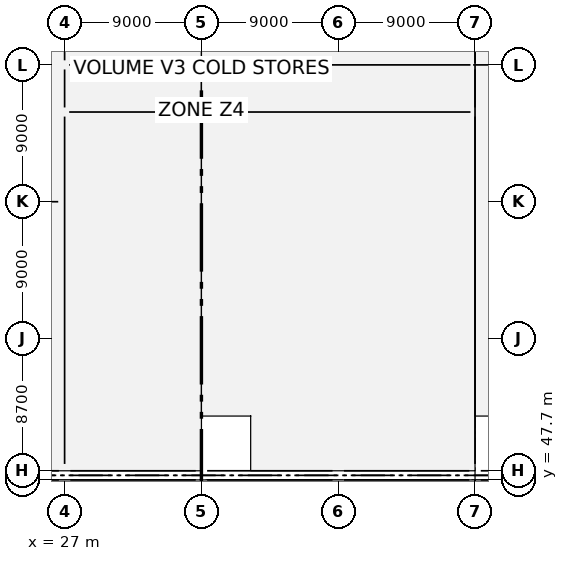
"""IFC4 building model, lengths in metres.
Left out: names, types, materials, properties, quantities, classifications, styles, units other than length and angle.
Written with IfcOpenShell. Run it as: python <this file> out.ifc"""

import sys

from ifc_helpers import new_model, si_unit, direction, frame, frame_2d, origin, origin_2d, place, context, subcontext, project, spatial, rectangle, extrude, element, fill, save


model = new_model("IFC4")
c1 = context("Model", 3, precision=1e-05, world=origin(), true_north=direction((0.0, 1.0)))
c2 = subcontext(c1, "Body", "Model", "MODEL_VIEW")
j1 = project(units=[si_unit("LENGTHUNIT", "METRE"), si_unit("PLANEANGLEUNIT", "RADIAN")], contexts=[c1])
p1 = place(None, origin())
s1 = spatial("IfcSite", under=j1, at=p1, CompositionType="ELEMENT")
p2 = place(p1, origin())
s2 = spatial("IfcBuilding", under=s1, at=p2, CompositionType="ELEMENT")
p3 = place(p2, origin())
s3 = spatial("IfcBuildingStorey", under=s2, at=p3, CompositionType="ELEMENT", Elevation=0.0)
for number, where, z_axis, x_axis in (
    (1, (27.0, 47.7, -0.5), (0.0, 0.0, 1.0), (1.0, 0.0, 0.0)),
    (2, (27.0, 48.3, -0.5), (0.0, 0.0, 1.0), (1.0, 0.0, 0.0)),
):
    element("IfcColumn", number, at=place(p3, frame(where, z_axis=z_axis, x_axis=x_axis)), inside=s3, PredefinedType="COLUMN", context=c2, shape_type="SweptSolid", body=[
        extrude(rectangle(XDim=0.75, YDim=0.55, at=origin_2d()), origin(), (0.0, 0.0, 1.0), 6.8),
    ])
for number, where, z_axis, x_axis in (
    (3, (27.0, 57.0, -0.5), (0.0, 0.0, 1.0), (1.0, 0.0, 0.0)),
    (4, (27.0, 66.0, -0.5), (0.0, 0.0, 1.0), (1.0, 0.0, 0.0)),
    (5, (27.0, 75.0, -0.5), (0.0, 0.0, 1.0), (1.0, 0.0, 0.0)),
):
    element("IfcColumn", number, at=place(p3, frame(where, z_axis=z_axis, x_axis=x_axis)), inside=s3, PredefinedType="COLUMN", context=c2, shape_type="SweptSolid", body=[
        extrude(rectangle(XDim=0.75, YDim=0.75, at=origin_2d()), origin(), (0.0, 0.0, 1.0), 6.8),
    ])
for number, where, z_axis, x_axis in (
    (6, (36.0, 47.7, -0.5), (0.0, 0.0, 1.0), (1.0, 0.0, 0.0)),
    (7, (36.0, 48.3, -0.5), (0.0, 0.0, 1.0), (1.0, 0.0, 0.0)),
):
    element("IfcColumn", number, at=place(p3, frame(where, z_axis=z_axis, x_axis=x_axis)), inside=s3, PredefinedType="COLUMN", context=c2, shape_type="SweptSolid", body=[
        extrude(rectangle(XDim=0.75, YDim=0.55, at=origin_2d()), origin(), (0.0, 0.0, 1.0), 6.8),
    ])
for number, where, z_axis, x_axis in (
    (8, (36.0, 57.0, -0.5), (0.0, 0.0, 1.0), (1.0, 0.0, 0.0)),
    (9, (36.0, 66.0, -0.5), (0.0, 0.0, 1.0), (1.0, 0.0, 0.0)),
    (10, (36.0, 75.0, -0.5), (0.0, 0.0, 1.0), (1.0, 0.0, 0.0)),
):
    element("IfcColumn", number, at=place(p3, frame(where, z_axis=z_axis, x_axis=x_axis)), inside=s3, PredefinedType="COLUMN", context=c2, shape_type="SweptSolid", body=[
        extrude(rectangle(XDim=0.75, YDim=0.75, at=origin_2d()), origin(), (0.0, 0.0, 1.0), 6.8),
    ])
for number, where, z_axis, x_axis in (
    (11, (45.0, 47.7, -0.5), (0.0, 0.0, 1.0), (1.0, 0.0, 0.0)),
    (12, (45.0, 48.3, -0.5), (0.0, 0.0, 1.0), (1.0, 0.0, 0.0)),
):
    element("IfcColumn", number, at=place(p3, frame(where, z_axis=z_axis, x_axis=x_axis)), inside=s3, PredefinedType="COLUMN", context=c2, shape_type="SweptSolid", body=[
        extrude(rectangle(XDim=0.75, YDim=0.55, at=origin_2d()), origin(), (0.0, 0.0, 1.0), 6.8),
    ])
for number, where, z_axis, x_axis in (
    (13, (45.0, 57.0, -0.5), (0.0, 0.0, 1.0), (1.0, 0.0, 0.0)),
    (14, (45.0, 66.0, -0.5), (0.0, 0.0, 1.0), (1.0, 0.0, 0.0)),
    (15, (45.0, 75.0, -0.5), (0.0, 0.0, 1.0), (1.0, 0.0, 0.0)),
):
    element("IfcColumn", number, at=place(p3, frame(where, z_axis=z_axis, x_axis=x_axis)), inside=s3, PredefinedType="COLUMN", context=c2, shape_type="SweptSolid", body=[
        extrude(rectangle(XDim=0.75, YDim=0.75, at=origin_2d()), origin(), (0.0, 0.0, 1.0), 6.8),
    ])
for number, where, z_axis, x_axis in (
    (16, (54.0, 47.7, -0.5), (0.0, 0.0, 1.0), (1.0, 0.0, 0.0)),
    (17, (54.0, 48.3, -0.5), (0.0, 0.0, 1.0), (1.0, 0.0, 0.0)),
):
    element("IfcColumn", number, at=place(p3, frame(where, z_axis=z_axis, x_axis=x_axis)), inside=s3, PredefinedType="COLUMN", context=c2, shape_type="SweptSolid", body=[
        extrude(rectangle(XDim=0.75, YDim=0.55, at=origin_2d()), origin(), (0.0, 0.0, 1.0), 6.8),
    ])
for number, where, z_axis, x_axis in (
    (18, (54.0, 57.0, -0.5), (0.0, 0.0, 1.0), (1.0, 0.0, 0.0)),
    (19, (54.0, 66.0, -0.5), (0.0, 0.0, 1.0), (1.0, 0.0, 0.0)),
    (20, (54.0, 75.0, -0.5), (0.0, 0.0, 1.0), (1.0, 0.0, 0.0)),
):
    element("IfcColumn", number, at=place(p3, frame(where, z_axis=z_axis, x_axis=x_axis)), inside=s3, PredefinedType="COLUMN", context=c2, shape_type="SweptSolid", body=[
        extrude(rectangle(XDim=0.75, YDim=0.75, at=origin_2d()), origin(), (0.0, 0.0, 1.0), 6.8),
    ])
for number, where, z_axis, x_axis in (
    (21, (18.375, 47.7, 0.0), (0.0, 0.0, 1.0), (1.0, 0.0, 0.0)),
    (22, (27.375, 47.7, 0.0), (0.0, 0.0, 1.0), (1.0, 0.0, 0.0)),
    (23, (36.375, 47.7, 0.0), (0.0, 0.0, 1.0), (1.0, 0.0, 0.0)),
    (24, (45.375, 47.7, 0.0), (0.0, 0.0, 1.0), (1.0, 0.0, 0.0)),
    (25, (54.375, 47.7, 0.0), (0.0, 0.0, 1.0), (1.0, 0.0, 0.0)),
):
    element("IfcWall", number, at=place(p3, frame(where, z_axis=z_axis, x_axis=x_axis)), inside=s3, PredefinedType="SOLIDWALL", context=c2, shape_type="SweptSolid", body=[
        extrude(rectangle(XDim=8.25, YDim=0.38, at=frame_2d((4.125, 0.0))), origin(), (0.0, 0.0, 1.0), 5.08),
    ])
p4 = place(p3, frame((18.375, 48.3, 0.0), z_axis=(0.0, 0.0, 1.0), x_axis=(1.0, 0.0, 0.0)))
e26 = element("IfcWall", 26, at=p4, inside=s3, PredefinedType="SOLIDWALL", context=c2, shape_type="SweptSolid", body=[
    extrude(rectangle(XDim=8.25, YDim=0.38, at=frame_2d((4.125, 0.0))), origin(), (0.0, 0.0, 1.0), 5.08),
])
p5 = place(p4, frame((3.325, 0.0, 3.59)))
e27 = element("IfcOpeningElement", 27, at=p5, cuts=e26, PredefinedType="OPENING", context=c2, shape_type="SweptSolid", body=[
    extrude(rectangle(XDim=1.6, YDim=1.45, at=frame_2d((0.8, 0.725))), frame((0.0, 0.2, 0.0), z_axis=(0.0, -1.0, 0.0), x_axis=(1.0, 0.0, 0.0)), (0.0, 0.0, 1.0), 0.4),
])
p6 = place(p3, frame((27.375, 48.3, 0.0), z_axis=(0.0, 0.0, 1.0), x_axis=(1.0, 0.0, 0.0)))
e28 = element("IfcWall", 28, at=p6, inside=s3, PredefinedType="SOLIDWALL", context=c2, shape_type="SweptSolid", body=[
    extrude(rectangle(XDim=8.25, YDim=0.38, at=frame_2d((4.125, 0.0))), origin(), (0.0, 0.0, 1.0), 5.08),
])
p7 = place(p3, frame((36.375, 48.3, 0.0), z_axis=(0.0, 0.0, 1.0), x_axis=(1.0, 0.0, 0.0)))
e29 = element("IfcWall", 29, at=p7, inside=s3, PredefinedType="SOLIDWALL", context=c2, shape_type="SweptSolid", body=[
    extrude(rectangle(XDim=8.25, YDim=0.38, at=frame_2d((4.125, 0.0))), origin(), (0.0, 0.0, 1.0), 5.08),
])
p8 = place(p7, frame((3.325, 0.0, 3.59)))
e30 = element("IfcOpeningElement", 30, at=p8, cuts=e29, PredefinedType="OPENING", context=c2, shape_type="SweptSolid", body=[
    extrude(rectangle(XDim=1.6, YDim=1.45, at=frame_2d((0.8, 0.725))), frame((0.0, 0.2, 0.0), z_axis=(0.0, -1.0, 0.0), x_axis=(1.0, 0.0, 0.0)), (0.0, 0.0, 1.0), 0.4),
])
p9 = place(p3, frame((45.375, 48.3, 0.0), z_axis=(0.0, 0.0, 1.0), x_axis=(1.0, 0.0, 0.0)))
e31 = element("IfcWall", 31, at=p9, inside=s3, PredefinedType="SOLIDWALL", context=c2, shape_type="SweptSolid", body=[
    extrude(rectangle(XDim=8.25, YDim=0.38, at=frame_2d((4.125, 0.0))), origin(), (0.0, 0.0, 1.0), 5.08),
])
p10 = place(p3, frame((54.375, 48.3, 0.0), z_axis=(0.0, 0.0, 1.0), x_axis=(1.0, 0.0, 0.0)))
e32 = element("IfcWall", 32, at=p10, inside=s3, PredefinedType="SOLIDWALL", context=c2, shape_type="SweptSolid", body=[
    extrude(rectangle(XDim=8.25, YDim=0.38, at=frame_2d((4.125, 0.0))), origin(), (0.0, 0.0, 1.0), 5.08),
])
p11 = place(p10, frame((3.325, 0.0, 3.59)))
e33 = element("IfcOpeningElement", 33, at=p11, cuts=e32, PredefinedType="OPENING", context=c2, shape_type="SweptSolid", body=[
    extrude(rectangle(XDim=1.6, YDim=1.45, at=frame_2d((0.8, 0.725))), frame((0.0, 0.2, 0.0), z_axis=(0.0, -1.0, 0.0), x_axis=(1.0, 0.0, 0.0)), (0.0, 0.0, 1.0), 0.4),
])
p12 = place(p3, frame((53.875, 75.0, -0.5), z_axis=(0.0, 0.0, 1.0), x_axis=(1.0, 0.0, 0.0)))
e34 = element("IfcWall", 34, at=p12, inside=s3, PredefinedType="SOLIDWALL", context=c2, shape_type="SweptSolid", body=[
    extrude(rectangle(XDim=9.25, YDim=0.25, at=frame_2d((4.625, 0.0))), origin(), (0.0, 0.0, 1.0), 6.8),
])
p13 = place(p3, frame((54.0, 75.125, -0.5), z_axis=(0.0, 0.0, 1.0), x_axis=(0.0, 1.0, 0.0)))
e35 = element("IfcWall", 35, at=p13, inside=s3, PredefinedType="SOLIDWALL", context=c2, shape_type="SweptSolid", body=[
    extrude(rectangle(XDim=7.95, YDim=0.25, at=frame_2d((3.975, 0.0))), origin(), (0.0, 0.0, 1.0), 6.8),
])
p14 = place(p13, frame((1.15, 0.0, 0.5)))
e36 = element("IfcOpeningElement", 36, at=p14, cuts=e35, PredefinedType="OPENING", context=c2, shape_type="SweptSolid", body=[
    extrude(rectangle(XDim=1.2, YDim=2.2, at=frame_2d((0.6, 1.1))), frame((0.0, 0.135, 0.0), z_axis=(0.0, -1.0, 0.0), x_axis=(1.0, 0.0, 0.0)), (0.0, 0.0, 1.0), 0.27),
])
p15 = place(p3, frame((18.42, 66.0, -0.5), z_axis=(0.0, 0.0, 1.0), x_axis=(1.0, 0.0, 0.0)))
e37 = element("IfcWall", 37, at=p15, inside=s3, PredefinedType="SHEAR", context=c2, shape_type="SweptSolid", body=[
    extrude(rectangle(XDim=8.16, YDim=0.33, at=frame_2d((4.08, 0.0))), origin(), (0.0, 0.0, 1.0), 6.48),
])
p16 = place(p3, frame((27.0, 72.2, 0.0), z_axis=(0.0, 0.0, 1.0), x_axis=(0.0, 1.0, 0.0)))
e38 = element("IfcWall", 38, at=p16, inside=s3, PredefinedType="PARTITIONING", context=c2, shape_type="SweptSolid", body=[
    extrude(rectangle(XDim=2.5, YDim=0.1, at=frame_2d((1.25, 0.0))), origin(), (0.0, 0.0, 1.0), 5.18),
])
p17 = place(p16, frame((0.78, 0.0, 0.0)))
e39 = element("IfcOpeningElement", 39, at=p17, cuts=e38, PredefinedType="OPENING", context=c2, shape_type="SweptSolid", body=[
    extrude(rectangle(XDim=0.94, YDim=2.14, at=frame_2d((0.47, 1.07))), frame((0.0, 0.06, 0.0), z_axis=(0.0, -1.0, 0.0), x_axis=(1.0, 0.0, 0.0)), (0.0, 0.0, 1.0), 0.12),
])
p18 = place(p3, frame((27.0, 48.75, 0.0), z_axis=(0.0, 0.0, 1.0), x_axis=(0.0, 1.0, 0.0)))
e40 = element("IfcWall", 40, at=p18, inside=s3, PredefinedType="STANDARD", context=c2, shape_type="SweptSolid", body=[
    extrude(rectangle(XDim=22.85, YDim=0.21, at=frame_2d((11.425, 0.0))), origin(), (0.0, 0.0, 1.0), 5.18),
])
p19 = place(p18, frame((11.75, 0.0, 0.0)))
e41 = element("IfcOpeningElement", 41, at=p19, cuts=e40, PredefinedType="OPENING", context=c2, shape_type="SweptSolid", body=[
    extrude(rectangle(XDim=2.0, YDim=2.5, at=frame_2d((1.0, 1.25))), frame((0.0, 0.115, 0.0), z_axis=(0.0, -1.0, 0.0), x_axis=(1.0, 0.0, 0.0)), (0.0, 0.0, 1.0), 0.23),
])
p20 = place(p3, frame((27.0, 75.3, 0.0), z_axis=(0.0, 0.0, 1.0), x_axis=(0.0, 1.0, 0.0)))
e42 = element("IfcWall", 42, at=p20, inside=s3, PredefinedType="STANDARD", context=c2, shape_type="SweptSolid", body=[
    extrude(rectangle(XDim=8.325, YDim=0.195, at=frame_2d((4.163, 0.0))), origin(), (0.0, 0.0, 1.0), 5.18),
])
p21 = place(p3, frame((27.3, 71.9, 0.0), z_axis=(0.0, 0.0, 1.0), x_axis=(1.0, 0.0, 0.0)))
e43 = element("IfcWall", 43, at=p21, inside=s3, PredefinedType="STANDARD", context=c2, shape_type="SweptSolid", body=[
    extrude(rectangle(XDim=26.4, YDim=0.21, at=frame_2d((13.2, 0.0))), origin(), (0.0, 0.0, 1.0), 5.95),
])
p22 = place(p21, frame((12.27, 0.0, 0.0)))
e44 = element("IfcOpeningElement", 44, at=p22, cuts=e43, PredefinedType="OPENING", context=c2, shape_type="SweptSolid", body=[
    extrude(rectangle(XDim=1.86, YDim=2.45, at=frame_2d((0.93, 1.225))), frame((0.0, 0.115, 0.0), z_axis=(0.0, -1.0, 0.0), x_axis=(1.0, 0.0, 0.0)), (0.0, 0.0, 1.0), 0.23),
])
p23 = place(p3, frame((27.3, 75.0, 0.0), z_axis=(0.0, 0.0, 1.0), x_axis=(1.0, 0.0, 0.0)))
e45 = element("IfcWall", 45, at=p23, inside=s3, PredefinedType="STANDARD", context=c2, shape_type="SweptSolid", body=[
    extrude(rectangle(XDim=26.4, YDim=0.195, at=frame_2d((13.2, 0.0))), origin(), (0.0, 0.0, 1.0), 5.13),
])
p24 = place(p23, frame((12.125, 0.0, 0.0)))
e46 = element("IfcOpeningElement", 46, at=p24, cuts=e45, PredefinedType="OPENING", context=c2, shape_type="SweptSolid", body=[
    extrude(rectangle(XDim=2.15, YDim=2.55, at=frame_2d((1.075, 1.275))), frame((0.0, 0.107, 0.0), z_axis=(0.0, -1.0, 0.0), x_axis=(1.0, 0.0, 0.0)), (0.0, 0.0, 1.0), 0.215),
])
p25 = place(p3, frame((54.0, 72.2, 0.0), z_axis=(0.0, 0.0, 1.0), x_axis=(0.0, 1.0, 0.0)))
e47 = element("IfcWall", 47, at=p25, inside=s3, PredefinedType="PARTITIONING", context=c2, shape_type="SweptSolid", body=[
    extrude(rectangle(XDim=2.5, YDim=0.14, at=frame_2d((1.25, 0.0))), origin(), (0.0, 0.0, 1.0), 5.18),
])
p26 = place(p25, frame((0.78, 0.0, 0.0)))
e48 = element("IfcOpeningElement", 48, at=p26, cuts=e47, PredefinedType="OPENING", context=c2, shape_type="SweptSolid", body=[
    extrude(rectangle(XDim=0.94, YDim=2.14, at=frame_2d((0.47, 1.07))), frame((0.0, 0.08, 0.0), z_axis=(0.0, -1.0, 0.0), x_axis=(1.0, 0.0, 0.0)), (0.0, 0.0, 1.0), 0.16),
])
p27 = place(p3, frame((54.0, 48.75, 0.0), z_axis=(0.0, 0.0, 1.0), x_axis=(0.0, 1.0, 0.0)))
e49 = element("IfcWall", 49, at=p27, inside=s3, PredefinedType="STANDARD", context=c2, shape_type="SweptSolid", body=[
    extrude(rectangle(XDim=22.85, YDim=0.21, at=frame_2d((11.425, 0.0))), origin(), (0.0, 0.0, 1.0), 5.18),
])
p28 = place(p27, frame((11.675, 0.0, 0.0)))
e50 = element("IfcOpeningElement", 50, at=p28, cuts=e49, PredefinedType="OPENING", context=c2, shape_type="SweptSolid", body=[
    extrude(rectangle(XDim=2.15, YDim=2.55, at=frame_2d((1.075, 1.275))), frame((0.0, 0.115, 0.0), z_axis=(0.0, -1.0, 0.0), x_axis=(1.0, 0.0, 0.0)), (0.0, 0.0, 1.0), 0.23),
])
p29 = place(p8, origin())
e51 = element("IfcWindow", 51, at=p29, inside=s3, PartitioningType="DOUBLE_PANEL_HORIZONTAL", PredefinedType="WINDOW", context=c2, shape_type="SweptSolid", body=[
    extrude(rectangle(XDim=1.6, YDim=1.45, at=frame_2d((0.8, 0.725))), frame((0.0, 0.03, 0.0), z_axis=(0.0, -1.0, 0.0), x_axis=(1.0, 0.0, 0.0)), (0.0, 0.0, 1.0), 0.06),
])
fill(e30, e51)
p30 = place(p17, origin())
e52 = element("IfcDoor", 52, at=p30, inside=s3, OperationType="SINGLE_SWING_LEFT", PredefinedType="DOOR", context=c2, shape_type="SweptSolid", body=[
    extrude(rectangle(XDim=0.94, YDim=2.14, at=frame_2d((0.47, 1.07))), frame((0.0, 0.025, 0.0), z_axis=(0.0, -1.0, 0.0), x_axis=(1.0, 0.0, 0.0)), (0.0, 0.0, 1.0), 0.05),
])
fill(e39, e52)
p31 = place(p19, origin())
e53 = element("IfcDoor", 53, at=p31, inside=s3, OperationType="SLIDING_TO_LEFT", PredefinedType="DOOR", context=c2, shape_type="SweptSolid", body=[
    extrude(rectangle(XDim=2.0, YDim=2.5, at=frame_2d((1.0, 1.25))), frame((0.0, 0.025, 0.0), z_axis=(0.0, -1.0, 0.0), x_axis=(1.0, 0.0, 0.0)), (0.0, 0.0, 1.0), 0.05),
])
fill(e41, e53)
p32 = place(p22, origin())
e54 = element("IfcDoor", 54, at=p32, inside=s3, OperationType="SLIDING_TO_LEFT", PredefinedType="DOOR", context=c2, shape_type="SweptSolid", body=[
    extrude(rectangle(XDim=1.86, YDim=2.45, at=frame_2d((0.93, 1.225))), frame((0.0, 0.025, 0.0), z_axis=(0.0, -1.0, 0.0), x_axis=(1.0, 0.0, 0.0)), (0.0, 0.0, 1.0), 0.05),
])
fill(e44, e54)
p33 = place(p24, origin())
e55 = element("IfcDoor", 55, at=p33, inside=s3, OperationType="SLIDING_TO_LEFT", PredefinedType="DOOR", context=c2, shape_type="SweptSolid", body=[
    extrude(rectangle(XDim=2.15, YDim=2.55, at=frame_2d((1.075, 1.275))), frame((0.0, 0.025, 0.0), z_axis=(0.0, -1.0, 0.0), x_axis=(1.0, 0.0, 0.0)), (0.0, 0.0, 1.0), 0.05),
])
fill(e46, e55)
p34 = place(p26, origin())
e56 = element("IfcDoor", 56, at=p34, inside=s3, OperationType="SINGLE_SWING_RIGHT", PredefinedType="DOOR", context=c2, shape_type="SweptSolid", body=[
    extrude(rectangle(XDim=0.94, YDim=2.14, at=frame_2d((0.47, 1.07))), frame((0.0, 0.025, 0.0), z_axis=(0.0, -1.0, 0.0), x_axis=(1.0, 0.0, 0.0)), (0.0, 0.0, 1.0), 0.05),
])
fill(e48, e56)
p35 = place(p28, origin())
e57 = element("IfcDoor", 57, at=p35, inside=s3, OperationType="SLIDING_TO_LEFT", PredefinedType="DOOR", context=c2, shape_type="SweptSolid", body=[
    extrude(rectangle(XDim=2.15, YDim=2.55, at=frame_2d((1.075, 1.275))), frame((0.0, 0.025, 0.0), z_axis=(0.0, -1.0, 0.0), x_axis=(1.0, 0.0, 0.0)), (0.0, 0.0, 1.0), 0.05),
])
fill(e50, e57)
save(model, sys.argv[1])
